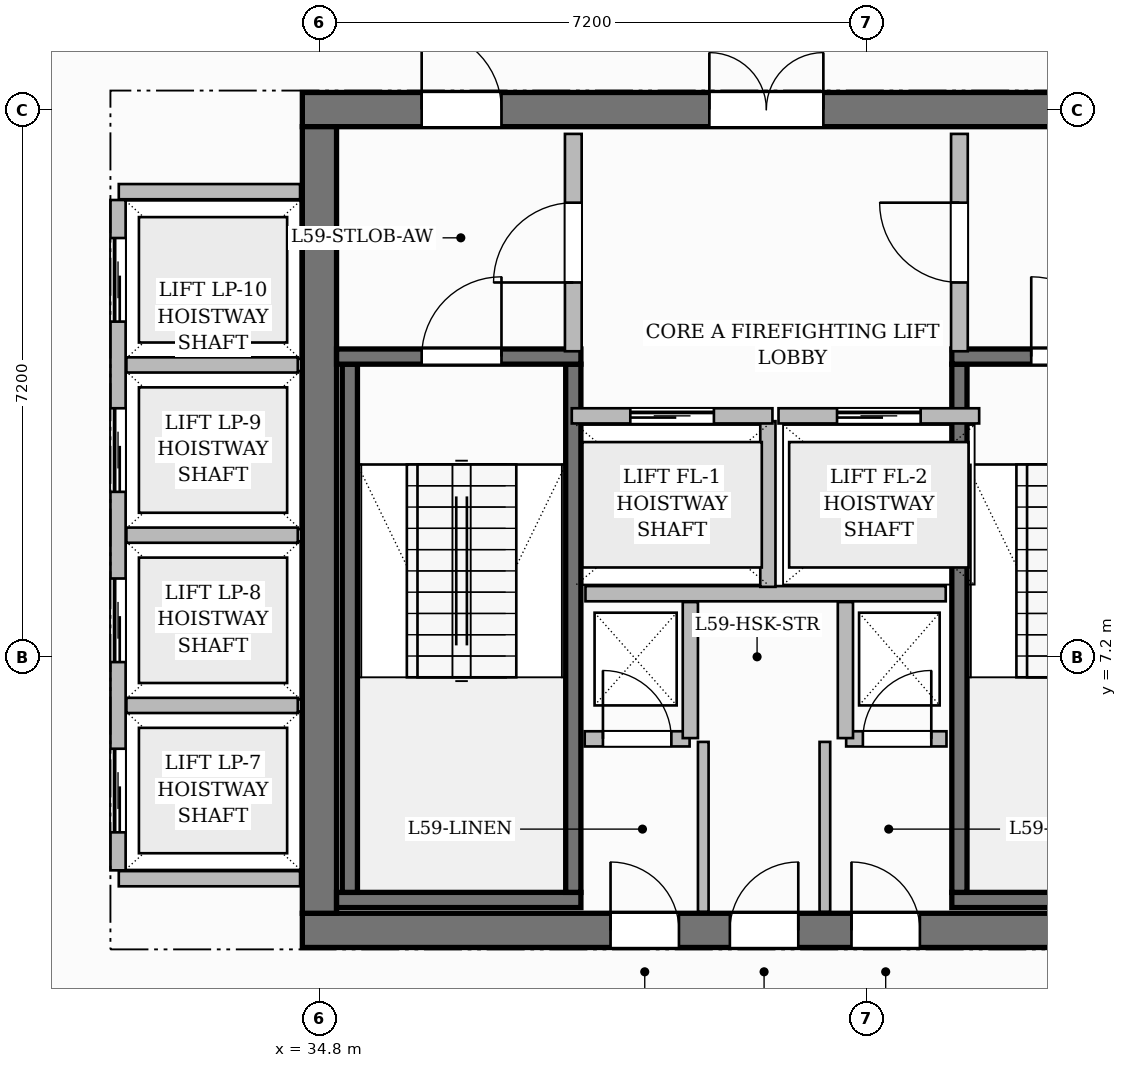
"""IFC4 building model, lengths in metres.
Left out: names, types, materials, properties, quantities, classifications, styles, units other than length and angle.
Written with IfcOpenShell. Run it as: python <this file> out.ifc"""

import sys

from ifc_helpers import new_model, si_unit, direction, frame, frame_2d, origin, place, context, subcontext, project, spatial, rectangle, extrude, source, transform, mapped, element, fill, save


model = new_model("IFC4")
c1 = context("Model", 3, precision=1e-05, world=origin(), true_north=direction((0.0, 1.0)))
c2 = subcontext(c1, "Body", "Model", "MODEL_VIEW")
j1 = project(units=[si_unit("LENGTHUNIT", "METRE"), si_unit("PLANEANGLEUNIT", "RADIAN")], contexts=[c1])
p1 = place(None, origin())
s1 = spatial("IfcSite", under=j1, at=p1, CompositionType="ELEMENT")
p2 = place(p1, origin())
s2 = spatial("IfcBuilding", under=s1, at=p2, CompositionType="ELEMENT")
p3 = place(p2, frame((0.0, 0.0, 236.55)))
s3 = spatial("IfcBuildingStorey", under=s2, at=p3, CompositionType="ELEMENT", Elevation=236.55)
p4 = place(p3, frame((34.575, 3.6, 0.0), z_axis=(0.0, 0.0, 1.0), x_axis=(1.0, 0.0, 0.0)))
e1 = element("IfcWall", 1, at=p4, inside=s3, PredefinedType="SHEAR", context=c2, shape_type="SweptSolid", body=[
    extrude(rectangle(XDim=15.45, YDim=0.45, at=frame_2d((7.725, 0.0))), origin(), (0.0, 0.0, 1.0), 3.85),
])
p5 = place(p4, frame((4.055, 0.0, 0.0)))
e2 = element("IfcOpeningElement", 2, at=p5, cuts=e1, PredefinedType="OPENING", context=c2, shape_type="SweptSolid", body=[
    extrude(rectangle(XDim=0.9, YDim=2.1, at=frame_2d((0.45, 1.05))), frame((0.0, 0.235, 0.0), z_axis=(0.0, -1.0, 0.0), x_axis=(1.0, 0.0, 0.0)), (0.0, 0.0, 1.0), 0.47),
])
p6 = place(p4, frame((5.625, 0.0, 0.0)))
e3 = element("IfcOpeningElement", 3, at=p6, cuts=e1, PredefinedType="OPENING", context=c2, shape_type="SweptSolid", body=[
    extrude(rectangle(XDim=0.9, YDim=2.1, at=frame_2d((0.45, 1.05))), frame((0.0, 0.235, 0.0), z_axis=(0.0, -1.0, 0.0), x_axis=(1.0, 0.0, 0.0)), (0.0, 0.0, 1.0), 0.47),
])
p7 = place(p4, frame((7.225, 0.0, 0.0)))
e4 = element("IfcOpeningElement", 4, at=p7, cuts=e1, PredefinedType="OPENING", context=c2, shape_type="SweptSolid", body=[
    extrude(rectangle(XDim=0.9, YDim=2.1, at=frame_2d((0.45, 1.05))), frame((0.0, 0.235, 0.0), z_axis=(0.0, -1.0, 0.0), x_axis=(1.0, 0.0, 0.0)), (0.0, 0.0, 1.0), 0.47),
])
p8 = place(p3, frame((34.575, 14.4, 0.0), z_axis=(0.0, 0.0, 1.0), x_axis=(1.0, 0.0, 0.0)))
e5 = element("IfcWall", 5, at=p8, inside=s3, PredefinedType="SHEAR", context=c2, shape_type="SweptSolid", body=[
    extrude(rectangle(XDim=15.45, YDim=0.45, at=frame_2d((7.725, 0.0))), origin(), (0.0, 0.0, 1.0), 3.85),
])
p9 = place(p8, frame((5.355, 0.0, 0.0)))
e6 = element("IfcOpeningElement", 6, at=p9, cuts=e5, PredefinedType="OPENING", context=c2, shape_type="SweptSolid", body=[
    extrude(rectangle(XDim=1.5, YDim=2.2, at=frame_2d((0.75, 1.1))), frame((0.0, 0.235, 0.0), z_axis=(0.0, -1.0, 0.0), x_axis=(1.0, 0.0, 0.0)), (0.0, 0.0, 1.0), 0.47),
])
p10 = place(p8, frame((1.57, 0.0, 0.0)))
e7 = element("IfcOpeningElement", 7, at=p10, cuts=e5, PredefinedType="OPENING", context=c2, shape_type="SweptSolid", body=[
    extrude(rectangle(XDim=1.05, YDim=2.15, at=frame_2d((0.525, 1.075))), frame((0.0, 0.235, 0.0), z_axis=(0.0, -1.0, 0.0), x_axis=(1.0, 0.0, 0.0)), (0.0, 0.0, 1.0), 0.47),
])
p11 = place(p8, frame((11.2, 0.0, 0.0)))
e8 = element("IfcOpeningElement", 8, at=p11, cuts=e5, PredefinedType="OPENING", context=c2, shape_type="SweptSolid", body=[
    extrude(rectangle(XDim=1.05, YDim=2.15, at=frame_2d((0.525, 1.075))), frame((0.0, 0.235, 0.0), z_axis=(0.0, -1.0, 0.0), x_axis=(1.0, 0.0, 0.0)), (0.0, 0.0, 1.0), 0.47),
])
p12 = place(p3, frame((34.8, 3.825, 0.0), z_axis=(0.0, 0.0, 1.0), x_axis=(0.0, 1.0, 0.0)))
e9 = element("IfcWall", 9, at=p12, inside=s3, PredefinedType="SHEAR", context=c2, shape_type="SweptSolid", body=[
    extrude(rectangle(XDim=10.35, YDim=0.45, at=frame_2d((5.175, 0.0))), origin(), (0.0, 0.0, 1.0), 3.85),
])
p13 = place(p3, frame((35.025, 4.0, 0.0), z_axis=(0.0, 0.0, 1.0), x_axis=(1.0, 0.0, 0.0)))
e10 = element("IfcWall", 10, at=p13, inside=s3, PredefinedType="SHEAR", context=c2, shape_type="SweptSolid", body=[
    extrude(rectangle(XDim=3.215, YDim=0.2, at=frame_2d((1.607, 0.0))), origin(), (0.0, 0.0, 1.0), 3.85),
])
for number, where, z_axis, x_axis in (
    (11, (35.2, 4.1, 0.0), (0.0, 0.0, 1.0), (0.0, 1.0, 0.0)),
    (12, (38.14, 4.1, 0.0), (0.0, 0.0, 1.0), (0.0, 1.0, 0.0)),
):
    element("IfcWall", number, at=place(p3, frame(where, z_axis=z_axis, x_axis=x_axis)), inside=s3, PredefinedType="SHEAR", context=c2, shape_type="SweptSolid", body=[
        extrude(rectangle(XDim=6.95, YDim=0.2, at=frame_2d((3.475, 0.0))), origin(), (0.0, 0.0, 1.0), 3.85),
    ])
p14 = place(p3, frame((35.025, 11.15, 0.0), z_axis=(0.0, 0.0, 1.0), x_axis=(1.0, 0.0, 0.0)))
e13 = element("IfcWall", 13, at=p14, inside=s3, PredefinedType="SHEAR", context=c2, shape_type="SweptSolid", body=[
    extrude(rectangle(XDim=3.215, YDim=0.2, at=frame_2d((1.607, 0.0))), origin(), (0.0, 0.0, 1.0), 3.85),
])
p15 = place(p14, frame((1.12, 0.0, 0.0)))
e14 = element("IfcOpeningElement", 14, at=p15, cuts=e13, PredefinedType="OPENING", context=c2, shape_type="SweptSolid", body=[
    extrude(rectangle(XDim=1.05, YDim=2.2, at=frame_2d((0.525, 1.1))), frame((0.0, 0.11, 0.0), z_axis=(0.0, -1.0, 0.0), x_axis=(1.0, 0.0, 0.0)), (0.0, 0.0, 1.0), 0.22),
])
p16 = place(p3, frame((43.12, 4.0, 0.0), z_axis=(0.0, 0.0, 1.0), x_axis=(1.0, 0.0, 0.0)))
e15 = element("IfcWall", 15, at=p16, inside=s3, PredefinedType="SHEAR", context=c2, shape_type="SweptSolid", body=[
    extrude(rectangle(XDim=6.455, YDim=0.2, at=frame_2d((3.228, 0.0))), origin(), (0.0, 0.0, 1.0), 3.85),
])
p17 = place(p3, frame((43.22, 4.1, 0.0), z_axis=(0.0, 0.0, 1.0), x_axis=(0.0, 1.0, 0.0)))
e16 = element("IfcWall", 16, at=p17, inside=s3, PredefinedType="SHEAR", context=c2, shape_type="SweptSolid", body=[
    extrude(rectangle(XDim=6.95, YDim=0.2, at=frame_2d((3.475, 0.0))), origin(), (0.0, 0.0, 1.0), 3.85),
])
p18 = place(p3, frame((43.12, 11.15, 0.0), z_axis=(0.0, 0.0, 1.0), x_axis=(1.0, 0.0, 0.0)))
e17 = element("IfcWall", 17, at=p18, inside=s3, PredefinedType="SHEAR", context=c2, shape_type="SweptSolid", body=[
    extrude(rectangle(XDim=6.455, YDim=0.2, at=frame_2d((3.228, 0.0))), origin(), (0.0, 0.0, 1.0), 3.85),
])
p19 = place(p18, frame((1.045, 0.0, 0.0)))
e18 = element("IfcOpeningElement", 18, at=p19, cuts=e17, PredefinedType="OPENING", context=c2, shape_type="SweptSolid", body=[
    extrude(rectangle(XDim=1.05, YDim=2.2, at=frame_2d((0.525, 1.1))), frame((0.0, 0.11, 0.0), z_axis=(0.0, -1.0, 0.0), x_axis=(1.0, 0.0, 0.0)), (0.0, 0.0, 1.0), 0.22),
])
p20 = place(p18, frame((4.125, 0.0, 0.0)))
e19 = element("IfcOpeningElement", 19, at=p20, cuts=e17, PredefinedType="OPENING", context=c2, shape_type="SweptSolid", body=[
    extrude(rectangle(XDim=1.05, YDim=2.2, at=frame_2d((0.525, 1.1))), frame((0.0, 0.11, 0.0), z_axis=(0.0, -1.0, 0.0), x_axis=(1.0, 0.0, 0.0)), (0.0, 0.0, 1.0), 0.22),
])
p21 = place(p3, frame((38.3, 8.03, 0.0), z_axis=(0.0, 0.0, 1.0), x_axis=(1.0, 0.0, 0.0)))
e20 = element("IfcWall", 20, at=p21, inside=s3, PredefinedType="PARTITIONING", context=c2, shape_type="SweptSolid", body=[
    extrude(rectangle(XDim=4.74, YDim=0.2, at=frame_2d((2.37, 0.0))), origin(), (0.0, 0.0, 1.0), 3.6),
])
p22 = place(p3, frame((40.7, 8.12, 0.0), z_axis=(0.0, 0.0, 1.0), x_axis=(0.0, 1.0, 0.0)))
e21 = element("IfcWall", 21, at=p22, inside=s3, PredefinedType="PARTITIONING", context=c2, shape_type="SweptSolid", body=[
    extrude(rectangle(XDim=2.18, YDim=0.2, at=frame_2d((1.09, 0.0))), origin(), (0.0, 0.0, 1.0), 3.6),
])
p23 = place(p3, frame((38.14, 11.22, 0.0), z_axis=(0.0, 0.0, 1.0), x_axis=(0.0, 1.0, 0.0)))
e22 = element("IfcWall", 22, at=p23, inside=s3, PredefinedType="PARTITIONING", context=c2, shape_type="SweptSolid", body=[
    extrude(rectangle(XDim=2.86, YDim=0.22, at=frame_2d((1.43, 0.0))), origin(), (0.0, 0.0, 1.0), 3.6),
])
p24 = place(p23, frame((0.905, 0.0, 0.0)))
e23 = element("IfcOpeningElement", 23, at=p24, cuts=e22, PredefinedType="OPENING", context=c2, shape_type="SweptSolid", body=[
    extrude(rectangle(XDim=1.05, YDim=2.15, at=frame_2d((0.525, 1.075))), frame((0.0, 0.12, 0.0), z_axis=(0.0, -1.0, 0.0), x_axis=(1.0, 0.0, 0.0)), (0.0, 0.0, 1.0), 0.24),
])
p25 = place(p3, frame((43.22, 11.22, 0.0), z_axis=(0.0, 0.0, 1.0), x_axis=(0.0, 1.0, 0.0)))
e24 = element("IfcWall", 24, at=p25, inside=s3, PredefinedType="PARTITIONING", context=c2, shape_type="SweptSolid", body=[
    extrude(rectangle(XDim=2.86, YDim=0.22, at=frame_2d((1.43, 0.0))), origin(), (0.0, 0.0, 1.0), 3.6),
])
p26 = place(p25, frame((0.905, 0.0, 0.0)))
e25 = element("IfcOpeningElement", 25, at=p26, cuts=e24, PredefinedType="OPENING", context=c2, shape_type="SweptSolid", body=[
    extrude(rectangle(XDim=1.05, YDim=2.15, at=frame_2d((0.525, 1.075))), frame((0.0, 0.12, 0.0), z_axis=(0.0, -1.0, 0.0), x_axis=(1.0, 0.0, 0.0)), (0.0, 0.0, 1.0), 0.24),
])
p27 = place(p3, frame((38.29, 6.12, 0.0), z_axis=(0.0, 0.0, 1.0), x_axis=(1.0, 0.0, 0.0)))
e26 = element("IfcWall", 26, at=p27, inside=s3, PredefinedType="PARTITIONING", context=c2, shape_type="SweptSolid", body=[
    extrude(rectangle(XDim=1.38, YDim=0.2, at=frame_2d((0.69, 0.0))), origin(), (0.0, 0.0, 1.0), 3.6),
])
p28 = place(p27, frame((0.24, 0.0, 0.0)))
e27 = element("IfcOpeningElement", 27, at=p28, cuts=e26, PredefinedType="OPENING", context=c2, shape_type="SweptSolid", body=[
    extrude(rectangle(XDim=0.9, YDim=2.1, at=frame_2d((0.45, 1.05))), frame((0.0, 0.11, 0.0), z_axis=(0.0, -1.0, 0.0), x_axis=(1.0, 0.0, 0.0)), (0.0, 0.0, 1.0), 0.22),
])
p29 = place(p3, frame((39.68, 6.13, 0.0), z_axis=(0.0, 0.0, 1.0), x_axis=(0.0, 1.0, 0.0)))
e28 = element("IfcWall", 28, at=p29, inside=s3, PredefinedType="PARTITIONING", context=c2, shape_type="SweptSolid", body=[
    extrude(rectangle(XDim=1.79, YDim=0.2, at=frame_2d((0.895, 0.0))), origin(), (0.0, 0.0, 1.0), 3.6),
])
p30 = place(p3, frame((41.73, 6.12, 0.0), z_axis=(0.0, 0.0, 1.0), x_axis=(1.0, 0.0, 0.0)))
e29 = element("IfcWall", 29, at=p30, inside=s3, PredefinedType="PARTITIONING", context=c2, shape_type="SweptSolid", body=[
    extrude(rectangle(XDim=1.32, YDim=0.2, at=frame_2d((0.66, 0.0))), origin(), (0.0, 0.0, 1.0), 3.6),
])
p31 = place(p30, frame((0.22, 0.0, 0.0)))
e30 = element("IfcOpeningElement", 30, at=p31, cuts=e29, PredefinedType="OPENING", context=c2, shape_type="SweptSolid", body=[
    extrude(rectangle(XDim=0.9, YDim=2.1, at=frame_2d((0.45, 1.05))), frame((0.0, 0.11, 0.0), z_axis=(0.0, -1.0, 0.0), x_axis=(1.0, 0.0, 0.0)), (0.0, 0.0, 1.0), 0.22),
])
p32 = place(p3, frame((41.72, 6.13, 0.0), z_axis=(0.0, 0.0, 1.0), x_axis=(0.0, 1.0, 0.0)))
e31 = element("IfcWall", 31, at=p32, inside=s3, PredefinedType="PARTITIONING", context=c2, shape_type="SweptSolid", body=[
    extrude(rectangle(XDim=1.79, YDim=0.2, at=frame_2d((0.895, 0.0))), origin(), (0.0, 0.0, 1.0), 3.6),
])
for number, where, z_axis, x_axis in (
    (32, (39.85, 3.845, 0.0), (0.0, 0.0, 1.0), (0.0, 1.0, 0.0)),
    (33, (41.45, 3.845, 0.0), (0.0, 0.0, 1.0), (0.0, 1.0, 0.0)),
):
    element("IfcWall", number, at=place(p3, frame(where, z_axis=z_axis, x_axis=x_axis)), inside=s3, PredefinedType="PARTITIONING", context=c2, shape_type="SweptSolid", body=[
        extrude(rectangle(XDim=2.235, YDim=0.14, at=frame_2d((1.118, 0.0))), origin(), (0.0, 0.0, 1.0), 3.6),
    ])
for number, where, z_axis, x_axis in (
    (34, (32.16, 4.28, 0.0), (0.0, 0.0, 1.0), (1.0, 0.0, 0.0)),
    (35, (32.16, 13.32, 0.0), (0.0, 0.0, 1.0), (1.0, 0.0, 0.0)),
):
    element("IfcWall", number, at=place(p3, frame(where, z_axis=z_axis, x_axis=x_axis)), inside=s3, PredefinedType="PARTITIONING", context=c2, shape_type="SweptSolid", body=[
        extrude(rectangle(XDim=2.385, YDim=0.2, at=frame_2d((1.192, 0.0))), origin(), (0.0, 0.0, 1.0), 3.6),
    ])
p33 = place(p3, frame((32.15, 4.39, 0.0), z_axis=(0.0, 0.0, 1.0), x_axis=(0.0, 1.0, 0.0)))
e36 = element("IfcWall", 36, at=p33, inside=s3, PredefinedType="PARTITIONING", context=c2, shape_type="SweptSolid", body=[
    extrude(rectangle(XDim=8.82, YDim=0.2, at=frame_2d((4.41, 0.0))), origin(), (0.0, 0.0, 1.0), 3.6),
])
p34 = place(p33, frame((0.5, 0.0, 0.0)))
e37 = element("IfcOpeningElement", 37, at=p34, cuts=e36, PredefinedType="OPENING", context=c2, shape_type="SweptSolid", body=[
    extrude(rectangle(XDim=1.1, YDim=2.2, at=frame_2d((0.55, 1.1))), frame((0.0, 0.11, 0.0), z_axis=(0.0, -1.0, 0.0), x_axis=(1.0, 0.0, 0.0)), (0.0, 0.0, 1.0), 0.22),
])
p35 = place(p33, frame((2.74, 0.0, 0.0)))
e38 = element("IfcOpeningElement", 38, at=p35, cuts=e36, PredefinedType="OPENING", context=c2, shape_type="SweptSolid", body=[
    extrude(rectangle(XDim=1.1, YDim=2.2, at=frame_2d((0.55, 1.1))), frame((0.0, 0.11, 0.0), z_axis=(0.0, -1.0, 0.0), x_axis=(1.0, 0.0, 0.0)), (0.0, 0.0, 1.0), 0.22),
])
p36 = place(p33, frame((4.98, 0.0, 0.0)))
e39 = element("IfcOpeningElement", 39, at=p36, cuts=e36, PredefinedType="OPENING", context=c2, shape_type="SweptSolid", body=[
    extrude(rectangle(XDim=1.1, YDim=2.2, at=frame_2d((0.55, 1.1))), frame((0.0, 0.11, 0.0), z_axis=(0.0, -1.0, 0.0), x_axis=(1.0, 0.0, 0.0)), (0.0, 0.0, 1.0), 0.22),
])
p37 = place(p33, frame((7.22, 0.0, 0.0)))
e40 = element("IfcOpeningElement", 40, at=p37, cuts=e36, PredefinedType="OPENING", context=c2, shape_type="SweptSolid", body=[
    extrude(rectangle(XDim=1.1, YDim=2.2, at=frame_2d((0.55, 1.1))), frame((0.0, 0.11, 0.0), z_axis=(0.0, -1.0, 0.0), x_axis=(1.0, 0.0, 0.0)), (0.0, 0.0, 1.0), 0.22),
])
for number, where, z_axis, x_axis in (
    (41, (32.26, 6.56, 0.0), (0.0, 0.0, 1.0), (1.0, 0.0, 0.0)),
    (42, (32.26, 8.8, 0.0), (0.0, 0.0, 1.0), (1.0, 0.0, 0.0)),
    (43, (32.26, 11.04, 0.0), (0.0, 0.0, 1.0), (1.0, 0.0, 0.0)),
):
    element("IfcWall", number, at=place(p3, frame(where, z_axis=z_axis, x_axis=x_axis)), inside=s3, PredefinedType="PARTITIONING", context=c2, shape_type="SweptSolid", body=[
        extrude(rectangle(XDim=2.255, YDim=0.2, at=frame_2d((1.127, 0.0))), origin(), (0.0, 0.0, 1.0), 3.6),
    ])
p38 = place(p3, frame((38.12, 10.37, 0.0), z_axis=(0.0, 0.0, 1.0), x_axis=(1.0, 0.0, 0.0)))
e44 = element("IfcWall", 44, at=p38, inside=s3, PredefinedType="PARTITIONING", context=c2, shape_type="SweptSolid", body=[
    extrude(rectangle(XDim=2.64, YDim=0.2, at=frame_2d((1.32, 0.0))), origin(), (0.0, 0.0, 1.0), 3.6),
])
p39 = place(p38, frame((0.77, 0.0, 0.0)))
e45 = element("IfcOpeningElement", 45, at=p39, cuts=e44, PredefinedType="OPENING", context=c2, shape_type="SweptSolid", body=[
    extrude(rectangle(XDim=1.1, YDim=2.2, at=frame_2d((0.55, 1.1))), frame((0.0, 0.11, 0.0), z_axis=(0.0, -1.0, 0.0), x_axis=(1.0, 0.0, 0.0)), (0.0, 0.0, 1.0), 0.22),
])
p40 = place(p3, frame((40.84, 10.37, 0.0), z_axis=(0.0, 0.0, 1.0), x_axis=(1.0, 0.0, 0.0)))
e46 = element("IfcWall", 46, at=p40, inside=s3, PredefinedType="PARTITIONING", context=c2, shape_type="SweptSolid", body=[
    extrude(rectangle(XDim=2.64, YDim=0.2, at=frame_2d((1.32, 0.0))), origin(), (0.0, 0.0, 1.0), 3.6),
])
p41 = place(p40, frame((0.77, 0.0, 0.0)))
e47 = element("IfcOpeningElement", 47, at=p41, cuts=e46, PredefinedType="OPENING", context=c2, shape_type="SweptSolid", body=[
    extrude(rectangle(XDim=1.1, YDim=2.2, at=frame_2d((0.55, 1.1))), frame((0.0, 0.11, 0.0), z_axis=(0.0, -1.0, 0.0), x_axis=(1.0, 0.0, 0.0)), (0.0, 0.0, 1.0), 0.22),
])
m1 = source(origin(), c2, "Body", "SweptSolid", [
    extrude(rectangle(XDim=1.05, YDim=2.2, at=frame_2d((0.525, 1.1))), frame((0.0, 0.025, 0.0), z_axis=(0.0, -1.0, 0.0), x_axis=(1.0, 0.0, 0.0)), (0.0, 0.0, 1.0), 0.05),
])
p42 = place(p15, origin())
e48 = element("IfcDoor", 48, at=p42, inside=s3, OperationType="SINGLE_SWING_RIGHT", PredefinedType="DOOR", context=c2, shape_type="MappedRepresentation", body=[
    mapped(m1, transform((0.0, 0.0, 0.0), scale=1.0)),
])
fill(e14, e48)
p43 = place(p19, origin())
e49 = element("IfcDoor", 49, at=p43, inside=s3, OperationType="SINGLE_SWING_LEFT", PredefinedType="DOOR", context=c2, shape_type="MappedRepresentation", body=[
    mapped(m1, transform((0.0, 0.0, 0.0), scale=1.0)),
])
fill(e18, e49)
m2 = source(origin(), c2, "Body", "SweptSolid", [
    extrude(rectangle(XDim=1.05, YDim=2.15, at=frame_2d((0.525, 1.075))), frame((0.0, 0.025, 0.0), z_axis=(0.0, -1.0, 0.0), x_axis=(1.0, 0.0, 0.0)), (0.0, 0.0, 1.0), 0.05),
])
p44 = place(p24, origin())
e50 = element("IfcDoor", 50, at=p44, inside=s3, OperationType="SINGLE_SWING_LEFT", PredefinedType="DOOR", context=c2, shape_type="MappedRepresentation", body=[
    mapped(m2, transform((0.0, 0.0, 0.0), scale=1.0)),
])
fill(e23, e50)
p45 = place(p26, origin())
e51 = element("IfcDoor", 51, at=p45, inside=s3, OperationType="SINGLE_SWING_RIGHT", PredefinedType="DOOR", context=c2, shape_type="MappedRepresentation", body=[
    mapped(m2, transform((0.0, 0.0, 0.0), scale=1.0)),
])
fill(e25, e51)
m3 = source(origin(), c2, "Body", "SweptSolid", [
    extrude(rectangle(XDim=1.5, YDim=2.2, at=frame_2d((0.75, 1.1))), frame((0.0, 0.025, 0.0), z_axis=(0.0, -1.0, 0.0), x_axis=(1.0, 0.0, 0.0)), (0.0, 0.0, 1.0), 0.05),
])
p46 = place(p9, origin())
e52 = element("IfcDoor", 52, at=p46, inside=s3, OperationType="DOUBLE_DOOR_SINGLE_SWING", PredefinedType="DOOR", context=c2, shape_type="MappedRepresentation", body=[
    mapped(m3, transform((0.0, 0.0, 0.0), scale=1.0)),
])
fill(e6, e52)
p47 = place(p10, origin())
e53 = element("IfcDoor", 53, at=p47, inside=s3, OperationType="SINGLE_SWING_LEFT", PredefinedType="DOOR", context=c2, shape_type="MappedRepresentation", body=[
    mapped(m2, transform((0.0, 0.0, 0.0), scale=1.0)),
])
fill(e7, e53)
m4 = source(origin(), c2, "Body", "SweptSolid", [
    extrude(rectangle(XDim=0.9, YDim=2.1, at=frame_2d((0.45, 1.05))), frame((0.0, 0.025, 0.0), z_axis=(0.0, -1.0, 0.0), x_axis=(1.0, 0.0, 0.0)), (0.0, 0.0, 1.0), 0.05),
])
p48 = place(p28, origin())
e54 = element("IfcDoor", 54, at=p48, inside=s3, OperationType="SINGLE_SWING_LEFT", PredefinedType="DOOR", context=c2, shape_type="MappedRepresentation", body=[
    mapped(m4, transform((0.0, 0.0, 0.0), scale=1.0)),
])
fill(e27, e54)
p49 = place(p31, origin())
e55 = element("IfcDoor", 55, at=p49, inside=s3, OperationType="SINGLE_SWING_RIGHT", PredefinedType="DOOR", context=c2, shape_type="MappedRepresentation", body=[
    mapped(m4, transform((0.0, 0.0, 0.0), scale=1.0)),
])
fill(e30, e55)
p50 = place(p5, origin())
e56 = element("IfcDoor", 56, at=p50, inside=s3, OperationType="SINGLE_SWING_LEFT", PredefinedType="DOOR", context=c2, shape_type="MappedRepresentation", body=[
    mapped(m4, transform((0.0, 0.0, 0.0), scale=1.0)),
])
fill(e2, e56)
p51 = place(p6, origin())
e57 = element("IfcDoor", 57, at=p51, inside=s3, OperationType="SINGLE_SWING_RIGHT", PredefinedType="DOOR", context=c2, shape_type="MappedRepresentation", body=[
    mapped(m4, transform((0.0, 0.0, 0.0), scale=1.0)),
])
fill(e3, e57)
p52 = place(p7, origin())
e58 = element("IfcDoor", 58, at=p52, inside=s3, OperationType="SINGLE_SWING_LEFT", PredefinedType="DOOR", context=c2, shape_type="MappedRepresentation", body=[
    mapped(m4, transform((0.0, 0.0, 0.0), scale=1.0)),
])
fill(e4, e58)
m5 = source(origin(), c2, "Body", "SweptSolid", [
    extrude(rectangle(XDim=1.1, YDim=2.2, at=frame_2d((0.55, 1.1))), frame((0.0, 0.025, 0.0), z_axis=(0.0, -1.0, 0.0), x_axis=(1.0, 0.0, 0.0)), (0.0, 0.0, 1.0), 0.05),
])
p53 = place(p39, origin())
e59 = element("IfcDoor", 59, at=p53, inside=s3, OperationType="SLIDING_TO_LEFT", PredefinedType="DOOR", context=c2, shape_type="MappedRepresentation", body=[
    mapped(m5, transform((0.0, 0.0, 0.0), scale=1.0)),
])
fill(e45, e59)
p54 = place(p41, origin())
e60 = element("IfcDoor", 60, at=p54, inside=s3, OperationType="SLIDING_TO_LEFT", PredefinedType="DOOR", context=c2, shape_type="MappedRepresentation", body=[
    mapped(m5, transform((0.0, 0.0, 0.0), scale=1.0)),
])
fill(e47, e60)
p55 = place(p34, origin())
e61 = element("IfcDoor", 61, at=p55, inside=s3, OperationType="SLIDING_TO_LEFT", PredefinedType="DOOR", context=c2, shape_type="MappedRepresentation", body=[
    mapped(m5, transform((0.0, 0.0, 0.0), scale=1.0)),
])
fill(e37, e61)
p56 = place(p35, origin())
e62 = element("IfcDoor", 62, at=p56, inside=s3, OperationType="SLIDING_TO_LEFT", PredefinedType="DOOR", context=c2, shape_type="MappedRepresentation", body=[
    mapped(m5, transform((0.0, 0.0, 0.0), scale=1.0)),
])
fill(e38, e62)
p57 = place(p36, origin())
e63 = element("IfcDoor", 63, at=p57, inside=s3, OperationType="SLIDING_TO_LEFT", PredefinedType="DOOR", context=c2, shape_type="MappedRepresentation", body=[
    mapped(m5, transform((0.0, 0.0, 0.0), scale=1.0)),
])
fill(e39, e63)
p58 = place(p37, origin())
e64 = element("IfcDoor", 64, at=p58, inside=s3, OperationType="SLIDING_TO_LEFT", PredefinedType="DOOR", context=c2, shape_type="MappedRepresentation", body=[
    mapped(m5, transform((0.0, 0.0, 0.0), scale=1.0)),
])
fill(e40, e64)
save(model, sys.argv[1])
